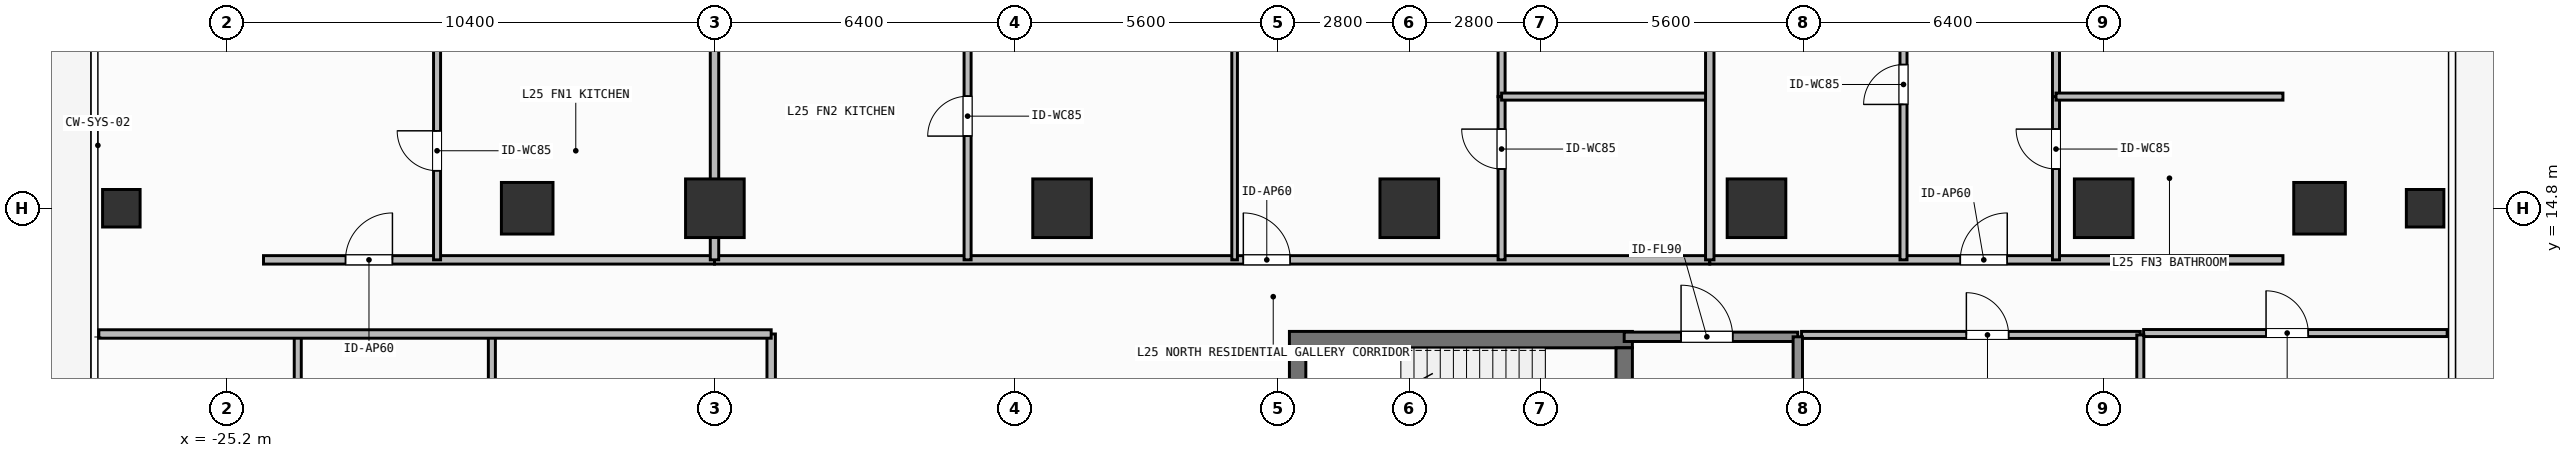
"""IFC4 building model, lengths in metres.
Left out: names, types, materials, properties, quantities, classifications, styles, units other than length and angle.
Written with IfcOpenShell. Run it as: python <this file> out.ifc"""

import sys

from ifc_helpers import new_model, si_unit, direction, frame, frame_2d, origin, origin_2d, place, context, subcontext, project, spatial, rectangle, hollow_rectangle, extrude, element, fill, save


model = new_model("IFC4")
c1 = context("Model", 3, precision=1e-05, world=origin(), true_north=direction((0.0, 1.0)))
c2 = subcontext(c1, "Body", "Model", "MODEL_VIEW")
j1 = project(units=[si_unit("LENGTHUNIT", "METRE"), si_unit("PLANEANGLEUNIT", "RADIAN")], contexts=[c1])
p1 = place(None, origin())
s1 = spatial("IfcSite", under=j1, at=p1, CompositionType="ELEMENT")
p2 = place(p1, origin())
s2 = spatial("IfcBuilding", under=s1, at=p2, CompositionType="ELEMENT")
p3 = place(p2, frame((0.0, 0.0, 100.8)))
s3 = spatial("IfcBuildingStorey", under=s2, at=p3, CompositionType="ELEMENT", Elevation=100.8)
p4 = place(p3, frame((-2.555, 12.0, 0.0), z_axis=(0.0, 0.0, 1.0), x_axis=(1.0, 0.0, 0.0)))
e1 = element("IfcWall", 1, at=p4, inside=s3, PredefinedType="SHEAR", context=c2, shape_type="SweptSolid", body=[
    extrude(rectangle(XDim=7.31, YDim=0.35, at=frame_2d((3.655, 0.0))), origin(), (0.0, 0.0, 1.0), 3.9),
])
p5 = place(p3, frame((-2.38, 8.9, 0.0), z_axis=(0.0, 0.0, 1.0), x_axis=(0.0, 1.0, 0.0)))
e2 = element("IfcWall", 2, at=p5, inside=s3, PredefinedType="SHEAR", context=c2, shape_type="SweptSolid", body=[
    extrude(rectangle(XDim=2.925, YDim=0.35, at=frame_2d((1.462, 0.0))), origin(), (0.0, 0.0, 1.0), 3.9),
])
p6 = place(p3, frame((4.58, 11.825, 0.0), z_axis=(0.0, 0.0, 1.0), x_axis=(0.0, -1.0, 0.0)))
e3 = element("IfcWall", 3, at=p6, inside=s3, PredefinedType="SHEAR", context=c2, shape_type="SweptSolid", body=[
    extrude(rectangle(XDim=2.925, YDim=0.35, at=frame_2d((1.462, 0.0))), origin(), (0.0, 0.0, 1.0), 3.9),
])
p7 = place(p6, frame((0.913, 0.0, 0.0)))
e4 = element("IfcOpeningElement", 4, at=p7, cuts=e3, PredefinedType="OPENING", context=c2, shape_type="SweptSolid", body=[
    extrude(rectangle(XDim=1.1, YDim=2.15, at=frame_2d((0.55, 1.075))), frame((0.0, 0.185, 0.0), z_axis=(0.0, -1.0, 0.0), x_axis=(1.0, 0.0, 0.0)), (0.0, 0.0, 1.0), 0.37),
])
for number, where, z_axis, x_axis in (
    (5, (-14.8, 14.8, 0.0), (0.0, 0.0, 1.0), (1.0, 0.0, 0.0)),
    (6, (-7.4, 14.8, 0.0), (0.0, 0.0, 1.0), (1.0, 0.0, 0.0)),
    (7, (0.0, 14.8, 0.0), (0.0, 0.0, 1.0), (1.0, 0.0, 0.0)),
    (8, (7.4, 14.8, 0.0), (0.0, 0.0, 1.0), (1.0, 0.0, 0.0)),
    (9, (14.8, 14.8, 0.0), (0.0, 0.0, 1.0), (1.0, 0.0, 0.0)),
):
    element("IfcColumn", number, at=place(p3, frame(where, z_axis=z_axis, x_axis=x_axis)), inside=s3, PredefinedType="COLUMN", context=c2, shape_type="SweptSolid", body=[
        extrude(rectangle(XDim=1.25, YDim=1.25, at=origin_2d()), origin(), (0.0, 0.0, 1.0), 3.9),
    ])
for number, where, z_axis, x_axis in (
    (10, (-18.8, 14.8, 0.0), (0.0, 0.0, 1.0), (1.0, 0.0, 0.0)),
    (11, (19.4, 14.8, 0.0), (0.0, 0.0, 1.0), (1.0, 0.0, 0.0)),
):
    element("IfcColumn", number, at=place(p3, frame(where, z_axis=z_axis, x_axis=x_axis)), inside=s3, PredefinedType="COLUMN", context=c2, shape_type="SweptSolid", body=[
        extrude(rectangle(XDim=1.1, YDim=1.1, at=origin_2d()), origin(), (0.0, 0.0, 1.0), 3.9),
    ])
for number, where, z_axis, x_axis in (
    (12, (-27.45, 14.8, 0.0), (0.0, 0.0, 1.0), (1.0, 0.0, 0.0)),
    (13, (21.65, 14.8, 0.0), (0.0, 0.0, 1.0), (1.0, 0.0, 0.0)),
):
    element("IfcColumn", number, at=place(p3, frame(where, z_axis=z_axis, x_axis=x_axis)), inside=s3, PredefinedType="COLUMN", context=c2, shape_type="SweptSolid", body=[
        extrude(hollow_rectangle(XDim=0.8, YDim=0.8, WallThickness=0.036, at=origin_2d()), origin(), (0.0, 0.0, 1.0), 3.9),
    ])
p8 = place(p3, frame((4.58, 12.06, 0.0), z_axis=(0.0, 0.0, 1.0), x_axis=(1.0, 0.0, 0.0)))
e14 = element("IfcWall", 14, at=p8, inside=s3, PredefinedType="SOLIDWALL", context=c2, shape_type="SweptSolid", body=[
    extrude(rectangle(XDim=3.7, YDim=0.2, at=frame_2d((1.85, 0.0))), origin(), (0.0, 0.0, 1.0), 3.68),
])
p9 = place(p8, frame((1.212, 0.0, 0.0)))
e15 = element("IfcOpeningElement", 15, at=p9, cuts=e14, PredefinedType="OPENING", context=c2, shape_type="SweptSolid", body=[
    extrude(rectangle(XDim=1.1, YDim=2.15, at=frame_2d((0.55, 1.075))), frame((0.0, 0.11, 0.0), z_axis=(0.0, -1.0, 0.0), x_axis=(1.0, 0.0, 0.0)), (0.0, 0.0, 1.0), 0.22),
])
p10 = place(p3, frame((8.36, 12.1, 0.0), z_axis=(0.0, 0.0, 1.0), x_axis=(1.0, 0.0, 0.0)))
e16 = element("IfcWall", 16, at=p10, inside=s3, PredefinedType="PARTITIONING", context=c2, shape_type="SweptSolid", body=[
    extrude(rectangle(XDim=7.22, YDim=0.15, at=frame_2d((3.61, 0.0))), origin(), (0.0, 0.0, 1.0), 3.68),
])
p11 = place(p10, frame((3.513, 0.0, 0.0)))
e17 = element("IfcOpeningElement", 17, at=p11, cuts=e16, PredefinedType="OPENING", context=c2, shape_type="SweptSolid", body=[
    extrude(rectangle(XDim=0.9, YDim=2.1, at=frame_2d((0.45, 1.05))), frame((0.0, 0.085, 0.0), z_axis=(0.0, -1.0, 0.0), x_axis=(1.0, 0.0, 0.0)), (0.0, 0.0, 1.0), 0.17),
])
p12 = place(p3, frame((-24.42, 13.7, 0.0), z_axis=(0.0, 0.0, 1.0), x_axis=(1.0, 0.0, 0.0)))
e18 = element("IfcWall", 18, at=p12, inside=s3, PredefinedType="PARTITIONING", context=c2, shape_type="SweptSolid", body=[
    extrude(rectangle(XDim=9.612, YDim=0.18, at=frame_2d((4.806, 0.0))), origin(), (0.0, 0.0, 1.0), 3.68),
])
p13 = place(p12, frame((1.748, 0.0, 0.0)))
e19 = element("IfcOpeningElement", 19, at=p13, cuts=e18, PredefinedType="OPENING", context=c2, shape_type="SweptSolid", body=[
    extrude(rectangle(XDim=1.0, YDim=2.2, at=frame_2d((0.5, 1.1))), frame((0.0, 0.1, 0.0), z_axis=(0.0, -1.0, 0.0), x_axis=(1.0, 0.0, 0.0)), (0.0, 0.0, 1.0), 0.2),
])
p14 = place(p3, frame((-20.721, 13.7, 0.0), z_axis=(0.0, 0.0, 1.0), x_axis=(0.0, 1.0, 0.0)))
e20 = element("IfcWall", 20, at=p14, inside=s3, PredefinedType="PARTITIONING", context=c2, shape_type="SweptSolid", body=[
    extrude(rectangle(XDim=4.651, YDim=0.15, at=frame_2d((2.326, 0.0))), origin(), (0.0, 0.0, 1.0), 3.68),
])
p15 = place(p14, frame((1.9, 0.0, 0.0)))
e21 = element("IfcOpeningElement", 21, at=p15, cuts=e20, PredefinedType="OPENING", context=c2, shape_type="SweptSolid", body=[
    extrude(rectangle(XDim=0.85, YDim=2.1, at=frame_2d((0.425, 1.05))), frame((0.0, 0.085, 0.0), z_axis=(0.0, -1.0, 0.0), x_axis=(1.0, 0.0, 0.0)), (0.0, 0.0, 1.0), 0.17),
])
p16 = place(p3, frame((-14.808, 13.7, 0.0), z_axis=(0.0, 0.0, 1.0), x_axis=(1.0, 0.0, 0.0)))
e22 = element("IfcWall", 22, at=p16, inside=s3, PredefinedType="PARTITIONING", context=c2, shape_type="SweptSolid", body=[
    extrude(rectangle(XDim=21.212, YDim=0.18, at=frame_2d((10.606, 0.0))), origin(), (0.0, 0.0, 1.0), 3.68),
])
p17 = place(p16, frame((11.271, 0.0, 0.0)))
e23 = element("IfcOpeningElement", 23, at=p17, cuts=e22, PredefinedType="OPENING", context=c2, shape_type="SweptSolid", body=[
    extrude(rectangle(XDim=1.0, YDim=2.2, at=frame_2d((0.5, 1.1))), frame((0.0, 0.1, 0.0), z_axis=(0.0, -1.0, 0.0), x_axis=(1.0, 0.0, 0.0)), (0.0, 0.0, 1.0), 0.2),
])
p18 = place(p3, frame((-3.723, 13.7, 0.0), z_axis=(0.0, 0.0, 1.0), x_axis=(0.0, 1.0, 0.0)))
e24 = element("IfcWall", 24, at=p18, inside=s3, PredefinedType="PARTITIONING", context=c2, shape_type="SweptSolid", body=[
    extrude(rectangle(XDim=12.89, YDim=0.12, at=frame_2d((6.445, 0.0))), origin(), (0.0, 0.0, 1.0), 3.68),
])
p19 = place(p18, frame((5.905, 0.0, 0.0)))
e25 = element("IfcOpeningElement", 25, at=p19, cuts=e24, PredefinedType="OPENING", context=c2, shape_type="SweptSolid", body=[
    extrude(rectangle(XDim=0.9, YDim=2.1, at=frame_2d((0.45, 1.05))), frame((0.0, 0.07, 0.0), z_axis=(0.0, -1.0, 0.0), x_axis=(1.0, 0.0, 0.0)), (0.0, 0.0, 1.0), 0.14),
])
p20 = place(p3, frame((-9.414, 13.7, 0.0), z_axis=(0.0, 0.0, 1.0), x_axis=(0.0, 1.0, 0.0)))
e26 = element("IfcWall", 26, at=p20, inside=s3, PredefinedType="PARTITIONING", context=c2, shape_type="SweptSolid", body=[
    extrude(rectangle(XDim=6.303, YDim=0.15, at=frame_2d((3.151, 0.0))), origin(), (0.0, 0.0, 1.0), 3.68),
])
p21 = place(p20, frame((2.638, 0.0, 0.0)))
e27 = element("IfcOpeningElement", 27, at=p21, cuts=e26, PredefinedType="OPENING", context=c2, shape_type="SweptSolid", body=[
    extrude(rectangle(XDim=0.85, YDim=2.1, at=frame_2d((0.425, 1.05))), frame((0.0, 0.085, 0.0), z_axis=(0.0, -1.0, 0.0), x_axis=(1.0, 0.0, 0.0)), (0.0, 0.0, 1.0), 0.17),
])
p22 = place(p3, frame((1.967, 13.7, 0.0), z_axis=(0.0, 0.0, 1.0), x_axis=(0.0, 1.0, 0.0)))
e28 = element("IfcWall", 28, at=p22, inside=s3, PredefinedType="PARTITIONING", context=c2, shape_type="SweptSolid", body=[
    extrude(rectangle(XDim=3.48, YDim=0.15, at=frame_2d((1.74, 0.0))), origin(), (0.0, 0.0, 1.0), 3.68),
])
p23 = place(p22, frame((1.937, 0.0, 0.0)))
e29 = element("IfcOpeningElement", 29, at=p23, cuts=e28, PredefinedType="OPENING", context=c2, shape_type="SweptSolid", body=[
    extrude(rectangle(XDim=0.85, YDim=2.1, at=frame_2d((0.425, 1.05))), frame((0.0, 0.085, 0.0), z_axis=(0.0, -1.0, 0.0), x_axis=(1.0, 0.0, 0.0)), (0.0, 0.0, 1.0), 0.17),
])
p24 = place(p3, frame((1.967, 17.18, 0.0), z_axis=(0.0, 0.0, 1.0), x_axis=(0.0, 1.0, 0.0)))
e30 = element("IfcWall", 30, at=p24, inside=s3, PredefinedType="PARTITIONING", context=c2, shape_type="SweptSolid", body=[
    extrude(rectangle(XDim=3.996, YDim=0.15, at=frame_2d((1.998, 0.0))), origin(), (0.0, 0.0, 1.0), 3.68),
])
p25 = place(p24, frame((1.573, 0.0, 0.0)))
e31 = element("IfcOpeningElement", 31, at=p25, cuts=e30, PredefinedType="OPENING", context=c2, shape_type="SweptSolid", body=[
    extrude(rectangle(XDim=0.85, YDim=2.1, at=frame_2d((0.425, 1.05))), frame((0.0, 0.085, 0.0), z_axis=(0.0, -1.0, 0.0), x_axis=(1.0, 0.0, 0.0)), (0.0, 0.0, 1.0), 0.17),
])
p26 = place(p3, frame((6.404, 13.7, 0.0), z_axis=(0.0, 0.0, 1.0), x_axis=(1.0, 0.0, 0.0)))
e32 = element("IfcWall", 32, at=p26, inside=s3, PredefinedType="PARTITIONING", context=c2, shape_type="SweptSolid", body=[
    extrude(rectangle(XDim=12.216, YDim=0.18, at=frame_2d((6.108, 0.0))), origin(), (0.0, 0.0, 1.0), 3.68),
])
p27 = place(p26, frame((5.34, 0.0, 0.0)))
e33 = element("IfcOpeningElement", 33, at=p27, cuts=e32, PredefinedType="OPENING", context=c2, shape_type="SweptSolid", body=[
    extrude(rectangle(XDim=1.0, YDim=2.2, at=frame_2d((0.5, 1.1))), frame((0.0, 0.1, 0.0), z_axis=(0.0, -1.0, 0.0), x_axis=(1.0, 0.0, 0.0)), (0.0, 0.0, 1.0), 0.2),
])
p28 = place(p3, frame((10.533, 13.7, 0.0), z_axis=(0.0, 0.0, 1.0), x_axis=(0.0, 1.0, 0.0)))
e34 = element("IfcWall", 34, at=p28, inside=s3, PredefinedType="PARTITIONING", context=c2, shape_type="SweptSolid", body=[
    extrude(rectangle(XDim=7.476, YDim=0.15, at=frame_2d((3.738, 0.0))), origin(), (0.0, 0.0, 1.0), 3.68),
])
p29 = place(p28, frame((3.313, 0.0, 0.0)))
e35 = element("IfcOpeningElement", 35, at=p29, cuts=e34, PredefinedType="OPENING", context=c2, shape_type="SweptSolid", body=[
    extrude(rectangle(XDim=0.85, YDim=2.1, at=frame_2d((0.425, 1.05))), frame((0.0, 0.085, 0.0), z_axis=(0.0, -1.0, 0.0), x_axis=(1.0, 0.0, 0.0)), (0.0, 0.0, 1.0), 0.17),
])
p30 = place(p3, frame((13.783, 13.7, 0.0), z_axis=(0.0, 0.0, 1.0), x_axis=(0.0, 1.0, 0.0)))
e36 = element("IfcWall", 36, at=p30, inside=s3, PredefinedType="PARTITIONING", context=c2, shape_type="SweptSolid", body=[
    extrude(rectangle(XDim=3.48, YDim=0.15, at=frame_2d((1.74, 0.0))), origin(), (0.0, 0.0, 1.0), 3.68),
])
p31 = place(p30, frame((1.937, 0.0, 0.0)))
e37 = element("IfcOpeningElement", 37, at=p31, cuts=e36, PredefinedType="OPENING", context=c2, shape_type="SweptSolid", body=[
    extrude(rectangle(XDim=0.85, YDim=2.1, at=frame_2d((0.425, 1.05))), frame((0.0, 0.085, 0.0), z_axis=(0.0, -1.0, 0.0), x_axis=(1.0, 0.0, 0.0)), (0.0, 0.0, 1.0), 0.17),
])
p32 = place(p3, frame((13.783, 17.18, 0.0), z_axis=(0.0, 0.0, 1.0), x_axis=(0.0, 1.0, 0.0)))
e38 = element("IfcWall", 38, at=p32, inside=s3, PredefinedType="PARTITIONING", context=c2, shape_type="SweptSolid", body=[
    extrude(rectangle(XDim=3.996, YDim=0.15, at=frame_2d((1.998, 0.0))), origin(), (0.0, 0.0, 1.0), 3.68),
])
p33 = place(p32, frame((1.396, 0.0, 0.0)))
e39 = element("IfcOpeningElement", 39, at=p33, cuts=e38, PredefinedType="OPENING", context=c2, shape_type="SweptSolid", body=[
    extrude(rectangle(XDim=0.85, YDim=2.1, at=frame_2d((0.425, 1.05))), frame((0.0, 0.085, 0.0), z_axis=(0.0, -1.0, 0.0), x_axis=(1.0, 0.0, 0.0)), (0.0, 0.0, 1.0), 0.17),
])
p34 = place(p3, frame((-13.6, -1.6, 0.0), z_axis=(0.0, 0.0, 1.0), x_axis=(0.0, 1.0, 0.0)))
e40 = element("IfcWall", 40, at=p34, inside=s3, PredefinedType="PARTITIONING", context=c2, shape_type="SweptSolid", body=[
    extrude(rectangle(XDim=13.72, YDim=0.18, at=frame_2d((6.86, 0.0))), origin(), (0.0, 0.0, 1.0), 3.68),
])
p35 = place(p34, frame((6.989, 0.0, 0.0)))
e41 = element("IfcOpeningElement", 41, at=p35, cuts=e40, PredefinedType="OPENING", context=c2, shape_type="SweptSolid", body=[
    extrude(rectangle(XDim=1.0, YDim=2.2, at=frame_2d((0.5, 1.1))), frame((0.0, 0.1, 0.0), z_axis=(0.0, -1.0, 0.0), x_axis=(1.0, 0.0, 0.0)), (0.0, 0.0, 1.0), 0.2),
])
p36 = place(p3, frame((15.65, 12.14, 0.0), z_axis=(0.0, 0.0, 1.0), x_axis=(1.0, 0.0, 0.0)))
e42 = element("IfcWall", 42, at=p36, inside=s3, PredefinedType="PARTITIONING", context=c2, shape_type="SweptSolid", body=[
    extrude(rectangle(XDim=6.47, YDim=0.15, at=frame_2d((3.235, 0.0))), origin(), (0.0, 0.0, 1.0), 3.68),
])
p37 = place(p36, frame((2.61, 0.0, 0.0)))
e43 = element("IfcOpeningElement", 43, at=p37, cuts=e42, PredefinedType="OPENING", context=c2, shape_type="SweptSolid", body=[
    extrude(rectangle(XDim=0.9, YDim=2.1, at=frame_2d((0.45, 1.05))), frame((0.0, 0.085, 0.0), z_axis=(0.0, -1.0, 0.0), x_axis=(1.0, 0.0, 0.0)), (0.0, 0.0, 1.0), 0.17),
])
p38 = place(p3, frame((8.28, 8.875, 0.0), z_axis=(0.0, 0.0, 1.0), x_axis=(0.0, 1.0, 0.0)))
e44 = element("IfcWall", 44, at=p38, inside=s3, PredefinedType="SOLIDWALL", context=c2, shape_type="SweptSolid", body=[
    extrude(rectangle(XDim=3.185, YDim=0.2, at=frame_2d((1.593, 0.0))), origin(), (0.0, 0.0, 1.0), 3.68),
])
p39 = place(p3, frame((15.58, 5.85, 0.0), z_axis=(0.0, 0.0, 1.0), x_axis=(0.0, 1.0, 0.0)))
e45 = element("IfcWall", 45, at=p39, inside=s3, PredefinedType="PARTITIONING", context=c2, shape_type="SweptSolid", body=[
    extrude(rectangle(XDim=6.25, YDim=0.15, at=frame_2d((3.125, 0.0))), origin(), (0.0, 0.0, 1.0), 3.68),
])
p40 = place(p3, frame((1.967, 17.18, 0.0), z_axis=(0.0, 0.0, 1.0), x_axis=(1.0, 0.0, 0.0)))
e46 = element("IfcWall", 46, at=p40, inside=s3, PredefinedType="PARTITIONING", context=c2, shape_type="SweptSolid", body=[
    extrude(rectangle(XDim=4.437, YDim=0.15, at=frame_2d((2.219, 0.0))), origin(), (0.0, 0.0, 1.0), 3.68),
])
p41 = place(p3, frame((-14.808, 13.7, 0.0), z_axis=(0.0, 0.0, 1.0), x_axis=(0.0, 1.0, 0.0)))
e47 = element("IfcWall", 47, at=p41, inside=s3, PredefinedType="PARTITIONING", context=c2, shape_type="SweptSolid", body=[
    extrude(rectangle(XDim=17.13, YDim=0.18, at=frame_2d((8.565, 0.0))), origin(), (0.0, 0.0, 1.0), 3.082),
])
p42 = place(p3, frame((13.783, 17.18, 0.0), z_axis=(0.0, 0.0, 1.0), x_axis=(1.0, 0.0, 0.0)))
e48 = element("IfcWall", 48, at=p42, inside=s3, PredefinedType="PARTITIONING", context=c2, shape_type="SweptSolid", body=[
    extrude(rectangle(XDim=4.837, YDim=0.15, at=frame_2d((2.418, 0.0))), origin(), (0.0, 0.0, 1.0), 3.68),
])
p43 = place(p3, frame((6.404, 13.7, 0.0), z_axis=(0.0, 0.0, 1.0), x_axis=(0.0, 1.0, 0.0)))
e49 = element("IfcWall", 49, at=p43, inside=s3, PredefinedType="PARTITIONING", context=c2, shape_type="SweptSolid", body=[
    extrude(rectangle(XDim=17.13, YDim=0.18, at=frame_2d((8.565, 0.0))), origin(), (0.0, 0.0, 1.0), 3.68),
])
for number, where, z_axis, x_axis in (
    (50, (-19.553, 9.32, 0.0), (0.0, 0.0, 1.0), (0.0, 1.0, 0.0)),
    (51, (-23.69, 9.32, 0.0), (0.0, 0.0, 1.0), (0.0, 1.0, 0.0)),
):
    element("IfcWall", number, at=place(p3, frame(where, z_axis=z_axis, x_axis=x_axis)), inside=s3, PredefinedType="PARTITIONING", context=c2, shape_type="SweptSolid", body=[
        extrude(rectangle(XDim=2.8, YDim=0.15, at=frame_2d((1.4, 0.0))), origin(), (0.0, 0.0, 1.0), 3.68),
    ])
p44 = place(p3, frame((-27.93, 12.12, 0.0), z_axis=(0.0, 0.0, 1.0), x_axis=(1.0, 0.0, 0.0)))
e52 = element("IfcWall", 52, at=p44, inside=s3, PredefinedType="PARTITIONING", context=c2, shape_type="SweptSolid", body=[
    extrude(rectangle(XDim=14.33, YDim=0.18, at=frame_2d((7.165, 0.0))), origin(), (0.0, 0.0, 1.0), 3.68),
])
p45 = place(p9, origin())
e53 = element("IfcDoor", 53, at=p45, inside=s3, OperationType="SINGLE_SWING_LEFT", PredefinedType="DOOR", context=c2, shape_type="SweptSolid", body=[
    extrude(rectangle(XDim=1.1, YDim=2.15, at=frame_2d((0.55, 1.075))), frame((0.0, 0.025, 0.0), z_axis=(0.0, -1.0, 0.0), x_axis=(1.0, 0.0, 0.0)), (0.0, 0.0, 1.0), 0.05),
])
fill(e15, e53)
p46 = place(p11, origin())
e54 = element("IfcDoor", 54, at=p46, inside=s3, OperationType="SINGLE_SWING_LEFT", PredefinedType="DOOR", context=c2, shape_type="SweptSolid", body=[
    extrude(rectangle(XDim=0.9, YDim=2.1, at=frame_2d((0.45, 1.05))), frame((0.0, 0.025, 0.0), z_axis=(0.0, -1.0, 0.0), x_axis=(1.0, 0.0, 0.0)), (0.0, 0.0, 1.0), 0.05),
])
fill(e17, e54)
p47 = place(p13, origin())
e55 = element("IfcDoor", 55, at=p47, inside=s3, OperationType="SINGLE_SWING_RIGHT", PredefinedType="DOOR", context=c2, shape_type="SweptSolid", body=[
    extrude(rectangle(XDim=1.0, YDim=2.2, at=frame_2d((0.5, 1.1))), frame((0.0, 0.025, 0.0), z_axis=(0.0, -1.0, 0.0), x_axis=(1.0, 0.0, 0.0)), (0.0, 0.0, 1.0), 0.05),
])
fill(e19, e55)
p48 = place(p15, origin())
e56 = element("IfcDoor", 56, at=p48, inside=s3, OperationType="SINGLE_SWING_RIGHT", PredefinedType="DOOR", context=c2, shape_type="SweptSolid", body=[
    extrude(rectangle(XDim=0.85, YDim=2.1, at=frame_2d((0.425, 1.05))), frame((0.0, 0.025, 0.0), z_axis=(0.0, -1.0, 0.0), x_axis=(1.0, 0.0, 0.0)), (0.0, 0.0, 1.0), 0.05),
])
fill(e21, e56)
p49 = place(p17, origin())
e57 = element("IfcDoor", 57, at=p49, inside=s3, OperationType="SINGLE_SWING_LEFT", PredefinedType="DOOR", context=c2, shape_type="SweptSolid", body=[
    extrude(rectangle(XDim=1.0, YDim=2.2, at=frame_2d((0.5, 1.1))), frame((0.0, 0.025, 0.0), z_axis=(0.0, -1.0, 0.0), x_axis=(1.0, 0.0, 0.0)), (0.0, 0.0, 1.0), 0.05),
])
fill(e23, e57)
p50 = place(p21, origin())
e58 = element("IfcDoor", 58, at=p50, inside=s3, OperationType="SINGLE_SWING_LEFT", PredefinedType="DOOR", context=c2, shape_type="SweptSolid", body=[
    extrude(rectangle(XDim=0.85, YDim=2.1, at=frame_2d((0.425, 1.05))), frame((0.0, 0.025, 0.0), z_axis=(0.0, -1.0, 0.0), x_axis=(1.0, 0.0, 0.0)), (0.0, 0.0, 1.0), 0.05),
])
fill(e27, e58)
p51 = place(p23, origin())
e59 = element("IfcDoor", 59, at=p51, inside=s3, OperationType="SINGLE_SWING_RIGHT", PredefinedType="DOOR", context=c2, shape_type="SweptSolid", body=[
    extrude(rectangle(XDim=0.85, YDim=2.1, at=frame_2d((0.425, 1.05))), frame((0.0, 0.025, 0.0), z_axis=(0.0, -1.0, 0.0), x_axis=(1.0, 0.0, 0.0)), (0.0, 0.0, 1.0), 0.05),
])
fill(e29, e59)
p52 = place(p27, origin())
e60 = element("IfcDoor", 60, at=p52, inside=s3, OperationType="SINGLE_SWING_RIGHT", PredefinedType="DOOR", context=c2, shape_type="SweptSolid", body=[
    extrude(rectangle(XDim=1.0, YDim=2.2, at=frame_2d((0.5, 1.1))), frame((0.0, 0.025, 0.0), z_axis=(0.0, -1.0, 0.0), x_axis=(1.0, 0.0, 0.0)), (0.0, 0.0, 1.0), 0.05),
])
fill(e33, e60)
p53 = place(p29, origin())
e61 = element("IfcDoor", 61, at=p53, inside=s3, OperationType="SINGLE_SWING_LEFT", PredefinedType="DOOR", context=c2, shape_type="SweptSolid", body=[
    extrude(rectangle(XDim=0.85, YDim=2.1, at=frame_2d((0.425, 1.05))), frame((0.0, 0.025, 0.0), z_axis=(0.0, -1.0, 0.0), x_axis=(1.0, 0.0, 0.0)), (0.0, 0.0, 1.0), 0.05),
])
fill(e35, e61)
p54 = place(p31, origin())
e62 = element("IfcDoor", 62, at=p54, inside=s3, OperationType="SINGLE_SWING_RIGHT", PredefinedType="DOOR", context=c2, shape_type="SweptSolid", body=[
    extrude(rectangle(XDim=0.85, YDim=2.1, at=frame_2d((0.425, 1.05))), frame((0.0, 0.025, 0.0), z_axis=(0.0, -1.0, 0.0), x_axis=(1.0, 0.0, 0.0)), (0.0, 0.0, 1.0), 0.05),
])
fill(e37, e62)
p55 = place(p37, origin())
e63 = element("IfcDoor", 63, at=p55, inside=s3, OperationType="SINGLE_SWING_LEFT", PredefinedType="DOOR", context=c2, shape_type="SweptSolid", body=[
    extrude(rectangle(XDim=0.9, YDim=2.1, at=frame_2d((0.45, 1.05))), frame((0.0, 0.025, 0.0), z_axis=(0.0, -1.0, 0.0), x_axis=(1.0, 0.0, 0.0)), (0.0, 0.0, 1.0), 0.05),
])
fill(e43, e63)
save(model, sys.argv[1])
